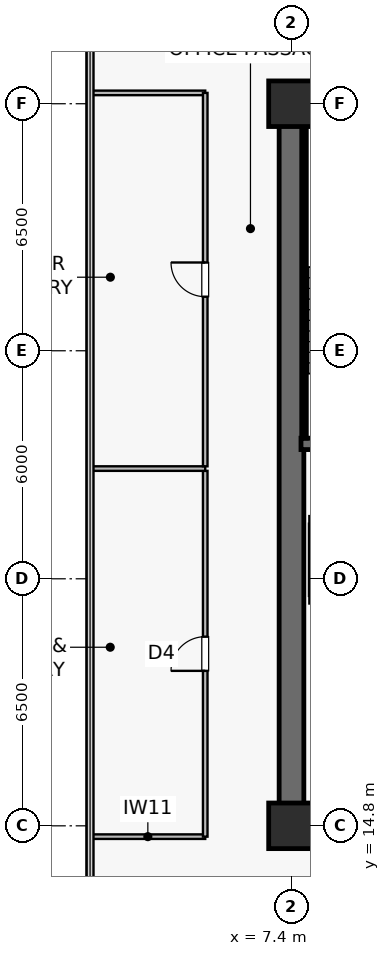
"""IFC4 building model, lengths in metres.
Left out: names, types, materials, properties, quantities, classifications, styles, units other than length and angle.
Written with IfcOpenShell. Run it as: python <this file> out.ifc"""

import sys

from ifc_helpers import new_model, si_unit, direction, frame, frame_2d, origin, origin_2d, place, context, subcontext, project, spatial, rectangle, extrude, source, transform, mapped, element, fill, save


model = new_model("IFC4")
c1 = context("Model", 3, precision=1e-05, world=origin(), true_north=direction((0.0, 1.0)))
c2 = subcontext(c1, "Body", "Model", "MODEL_VIEW")
j1 = project(units=[si_unit("LENGTHUNIT", "METRE"), si_unit("PLANEANGLEUNIT", "RADIAN")], contexts=[c1])
p1 = place(None, origin())
s1 = spatial("IfcSite", under=j1, at=p1, CompositionType="ELEMENT")
p2 = place(p1, origin())
s2 = spatial("IfcBuilding", under=s1, at=p2, CompositionType="ELEMENT")
p3 = place(p2, frame((0.0, 0.0, 166.6)))
s3 = spatial("IfcBuildingStorey", under=s2, at=p3, CompositionType="ELEMENT", Elevation=166.6)
p4 = place(p3, frame((7.075, 14.8, 0.0), z_axis=(0.0, 0.0, 1.0), x_axis=(1.0, 0.0, 0.0)))
e1 = element("IfcWall", 1, at=p4, inside=s3, PredefinedType="SHEAR", context=c2, shape_type="SweptSolid", body=[
    extrude(rectangle(XDim=15.45, YDim=0.65, at=frame_2d((7.725, 0.0))), origin(), (0.0, 0.0, 1.0), 3.79),
])
p5 = place(p3, frame((7.075, 33.8, 0.0), z_axis=(0.0, 0.0, 1.0), x_axis=(1.0, 0.0, 0.0)))
e2 = element("IfcWall", 2, at=p5, inside=s3, PredefinedType="SHEAR", context=c2, shape_type="SweptSolid", body=[
    extrude(rectangle(XDim=15.45, YDim=0.65, at=frame_2d((7.725, 0.0))), origin(), (0.0, 0.0, 1.0), 3.79),
])
p6 = place(p5, frame((5.675, 0.0, 0.0)))
e3 = element("IfcOpeningElement", 3, at=p6, cuts=e2, PredefinedType="OPENING", context=c2, shape_type="SweptSolid", body=[
    extrude(rectangle(XDim=0.95, YDim=2.15, at=frame_2d((0.475, 1.075))), frame((0.0, 0.335, 0.0), z_axis=(0.0, -1.0, 0.0), x_axis=(1.0, 0.0, 0.0)), (0.0, 0.0, 1.0), 0.67),
])
p7 = place(p5, frame((9.04, 0.0, 0.0)))
e4 = element("IfcOpeningElement", 4, at=p7, cuts=e2, PredefinedType="OPENING", context=c2, shape_type="SweptSolid", body=[
    extrude(rectangle(XDim=0.95, YDim=2.15, at=frame_2d((0.475, 1.075))), frame((0.0, 0.335, 0.0), z_axis=(0.0, -1.0, 0.0), x_axis=(1.0, 0.0, 0.0)), (0.0, 0.0, 1.0), 0.67),
])
p8 = place(p5, frame((12.44, 0.0, 0.0)))
e5 = element("IfcOpeningElement", 5, at=p8, cuts=e2, PredefinedType="OPENING", context=c2, shape_type="SweptSolid", body=[
    extrude(rectangle(XDim=0.95, YDim=2.15, at=frame_2d((0.475, 1.075))), frame((0.0, 0.335, 0.0), z_axis=(0.0, -1.0, 0.0), x_axis=(1.0, 0.0, 0.0)), (0.0, 0.0, 1.0), 0.67),
])
p9 = place(p3, frame((7.4, 15.125, 0.0), z_axis=(0.0, 0.0, 1.0), x_axis=(0.0, 1.0, 0.0)))
e6 = element("IfcWall", 6, at=p9, inside=s3, PredefinedType="SHEAR", context=c2, shape_type="SweptSolid", body=[
    extrude(rectangle(XDim=18.35, YDim=0.65, at=frame_2d((9.175, 0.0))), origin(), (0.0, 0.0, 1.0), 3.79),
])
p10 = place(p3, frame((7.65, 24.85, 0.0), z_axis=(0.0, 0.0, 1.0), x_axis=(1.0, 0.0, 0.0)))
e7 = element("IfcWall", 7, at=p10, inside=s3, PredefinedType="SHEAR", context=c2, shape_type="SweptSolid", body=[
    extrude(rectangle(XDim=3.8, YDim=0.3, at=frame_2d((1.9, 0.0))), origin(), (0.0, 0.0, 1.0), 3.79),
])
p11 = place(p3, frame((7.73, 33.4, 0.0), z_axis=(0.0, 0.0, 1.0), x_axis=(1.0, 0.0, 0.0)))
e8 = element("IfcWall", 8, at=p11, inside=s3, PredefinedType="SOLIDWALL", context=c2, shape_type="SweptSolid", body=[
    extrude(rectangle(XDim=3.72, YDim=0.12, at=frame_2d((1.86, 0.0))), origin(), (0.0, 0.0, 1.0), 3.79),
])
p12 = place(p3, frame((7.73, 25.0, 0.0), z_axis=(0.0, 0.0, 1.0), x_axis=(0.0, 1.0, 0.0)))
e9 = element("IfcWall", 9, at=p12, inside=s3, PredefinedType="SOLIDWALL", context=c2, shape_type="SweptSolid", body=[
    extrude(rectangle(XDim=8.32, YDim=0.12, at=frame_2d((4.16, 0.0))), origin(), (0.0, 0.0, 1.0), 3.79),
])
m1 = source(origin(), c2, "Body", "SweptSolid", [
    extrude(rectangle(XDim=1.2, YDim=1.2, at=origin_2d()), origin(), (0.0, 0.0, 1.0), 4.1),
])
for number, where, z_axis, x_axis in (
    (10, (7.4, 14.8, 0.0), (0.0, 0.0, 1.0), (1.0, 0.0, 0.0)),
    (11, (7.4, 33.8, 0.0), (0.0, 0.0, 1.0), (1.0, 0.0, 0.0)),
):
    element("IfcColumn", number, at=place(p3, frame(where, z_axis=z_axis, x_axis=x_axis)), inside=s3, PredefinedType="COLUMN", context=c2, shape_type="MappedRepresentation", body=[
        mapped(m1, transform((0.0, 0.0, 0.0), scale=1.0)),
    ])
for number, where, z_axis, x_axis in (
    (12, (7.87, 20.75, 0.0), (0.0, 0.0, 1.0), (1.0, 0.0, 0.0)),
    (13, (7.87, 22.85, 0.0), (0.0, 0.0, 1.0), (1.0, 0.0, 0.0)),
):
    element("IfcWall", number, at=place(p3, frame(where, z_axis=z_axis, x_axis=x_axis)), inside=s3, PredefinedType="SOLIDWALL", context=c2, shape_type="SweptSolid", body=[
        extrude(rectangle(XDim=2.26, YDim=0.2, at=frame_2d((1.13, 0.0))), origin(), (0.0, 0.0, 1.0), 3.79),
    ])
p13 = place(p3, frame((7.95, 20.85, 0.0), z_axis=(0.0, 0.0, 1.0), x_axis=(0.0, 1.0, 0.0)))
e14 = element("IfcWall", 14, at=p13, inside=s3, PredefinedType="SOLIDWALL", context=c2, shape_type="SweptSolid", body=[
    extrude(rectangle(XDim=1.9, YDim=0.18, at=frame_2d((0.95, 0.0))), origin(), (0.0, 0.0, 1.0), 3.79),
])
for number, where, z_axis, x_axis in (
    (15, (2.11, 14.515, 0.0), (0.0, 0.0, 1.0), (1.0, 0.0, 0.0)),
    (16, (2.11, 34.085, 0.0), (0.0, 0.0, 1.0), (1.0, 0.0, 0.0)),
):
    element("IfcWall", number, at=place(p3, frame(where, z_axis=z_axis, x_axis=x_axis)), inside=s3, PredefinedType="PARTITIONING", context=c2, shape_type="SweptSolid", body=[
        extrude(rectangle(XDim=3.02, YDim=0.12, at=frame_2d((1.51, 0.0))), origin(), (0.0, 0.0, 1.0), 3.79),
    ])
p14 = place(p3, frame((5.13, 14.515, 0.0), z_axis=(0.0, 0.0, 1.0), x_axis=(0.0, 1.0, 0.0)))
e17 = element("IfcWall", 17, at=p14, inside=s3, PredefinedType="PARTITIONING", context=c2, shape_type="SweptSolid", body=[
    extrude(rectangle(XDim=9.625, YDim=0.12, at=frame_2d((4.812, 0.0))), origin(), (0.0, 0.0, 1.0), 3.79),
])
p15 = place(p14, frame((4.363, 0.0, 0.0)))
e18 = element("IfcOpeningElement", 18, at=p15, cuts=e17, PredefinedType="OPENING", context=c2, shape_type="SweptSolid", body=[
    extrude(rectangle(XDim=0.9, YDim=2.1, at=frame_2d((0.45, 1.05))), frame((0.0, 0.07, 0.0), z_axis=(0.0, -1.0, 0.0), x_axis=(1.0, 0.0, 0.0)), (0.0, 0.0, 1.0), 0.14),
])
p16 = place(p3, frame((2.11, 24.2, 0.0), z_axis=(0.0, 0.0, 1.0), x_axis=(1.0, 0.0, 0.0)))
e19 = element("IfcWall", 19, at=p16, inside=s3, PredefinedType="PARTITIONING", context=c2, shape_type="SweptSolid", body=[
    extrude(rectangle(XDim=3.02, YDim=0.12, at=frame_2d((1.51, 0.0))), origin(), (0.0, 0.0, 1.0), 3.79),
])
p17 = place(p3, frame((5.13, 24.26, 0.0), z_axis=(0.0, 0.0, 1.0), x_axis=(0.0, 1.0, 0.0)))
e20 = element("IfcWall", 20, at=p17, inside=s3, PredefinedType="PARTITIONING", context=c2, shape_type="SweptSolid", body=[
    extrude(rectangle(XDim=9.825, YDim=0.12, at=frame_2d((4.913, 0.0))), origin(), (0.0, 0.0, 1.0), 3.79),
])
p18 = place(p17, frame((4.462, 0.0, 0.0)))
e21 = element("IfcOpeningElement", 21, at=p18, cuts=e20, PredefinedType="OPENING", context=c2, shape_type="SweptSolid", body=[
    extrude(rectangle(XDim=0.9, YDim=2.1, at=frame_2d((0.45, 1.05))), frame((0.0, 0.07, 0.0), z_axis=(0.0, -1.0, 0.0), x_axis=(1.0, 0.0, 0.0)), (0.0, 0.0, 1.0), 0.14),
])
m2 = source(origin(), c2, "Body", "SweptSolid", [
    extrude(rectangle(XDim=0.9, YDim=2.1, at=frame_2d((0.45, 1.05))), frame((0.0, 0.025, 0.0), z_axis=(0.0, -1.0, 0.0), x_axis=(1.0, 0.0, 0.0)), (0.0, 0.0, 1.0), 0.05),
])
p19 = place(p15, origin())
e22 = element("IfcDoor", 22, at=p19, inside=s3, OperationType="SINGLE_SWING_LEFT", PredefinedType="DOOR", context=c2, shape_type="MappedRepresentation", body=[
    mapped(m2, transform((0.0, 0.0, 0.0), scale=1.0)),
])
fill(e18, e22)
p20 = place(p18, origin())
e23 = element("IfcDoor", 23, at=p20, inside=s3, OperationType="SINGLE_SWING_RIGHT", PredefinedType="DOOR", context=c2, shape_type="MappedRepresentation", body=[
    mapped(m2, transform((0.0, 0.0, 0.0), scale=1.0)),
])
fill(e21, e23)
save(model, sys.argv[1])
